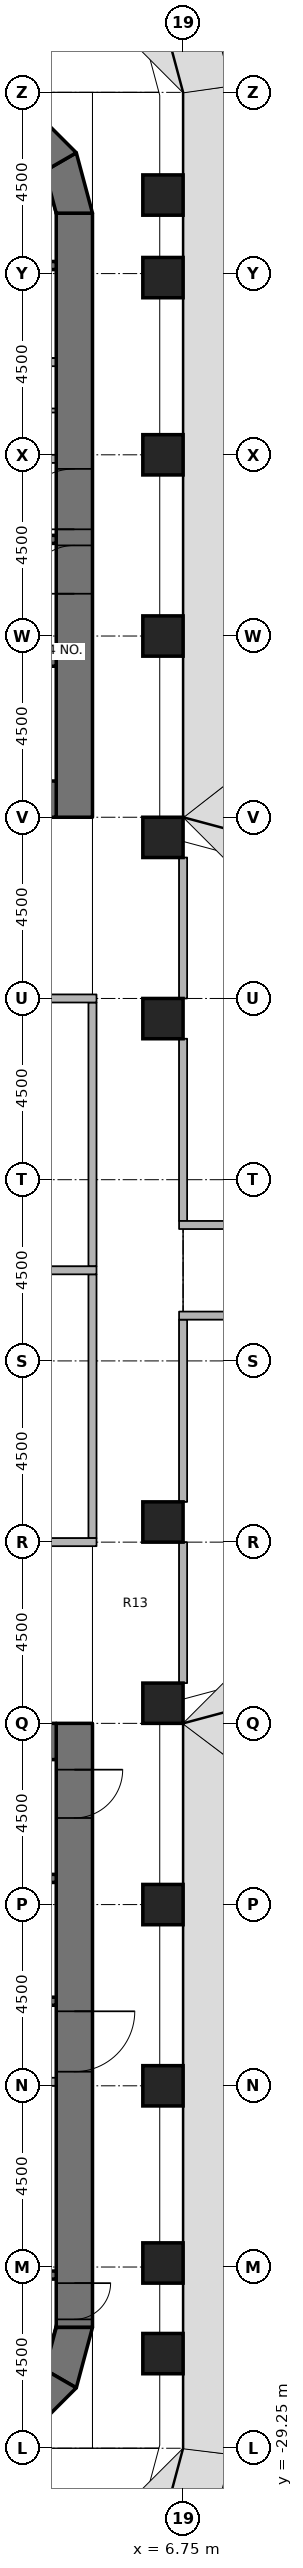
"""IFC4 building model, lengths in metres.
Left out: names, types, materials, properties, quantities, classifications, styles, units other than length and angle.
Written with IfcOpenShell. Run it as: python <this file> out.ifc"""

import sys

from ifc_helpers import new_model, si_unit, direction, frame, frame_2d, origin, origin_2d, place, context, subcontext, project, spatial, polyline, rectangle, outline, extrude, element, fill, save


model = new_model("IFC4")
c1 = context("Model", 3, precision=1e-05, world=origin(), true_north=direction((0.0, 1.0)))
c2 = subcontext(c1, "Body", "Model", "MODEL_VIEW")
j1 = project(units=[si_unit("LENGTHUNIT", "METRE"), si_unit("PLANEANGLEUNIT", "RADIAN")], contexts=[c1])
p1 = place(None, origin())
s1 = spatial("IfcSite", under=j1, at=p1, CompositionType="ELEMENT")
p2 = place(p1, origin())
s2 = spatial("IfcBuilding", under=s1, at=p2, CompositionType="ELEMENT")
p3 = place(p2, frame((0.0, 0.0, 43.8)))
s3 = spatial("IfcBuildingStorey", under=s2, at=p3, CompositionType="ELEMENT", Elevation=43.8)
for number, where, z_axis, x_axis in (
    (1, (6.25, -26.9, 0.0), (0.0, 0.0, 1.0), (1.0, 0.0, 0.0)),
    (2, (6.25, -24.65, 0.0), (0.0, 0.0, 1.0), (1.0, 0.0, 0.0)),
    (3, (6.25, -20.25, 0.0), (0.0, 0.0, 1.0), (1.0, 0.0, 0.0)),
    (4, (6.25, -15.75, 0.0), (0.0, 0.0, 1.0), (1.0, 0.0, 0.0)),
    (5, (6.25, -10.75, 0.0), (0.0, 0.0, 1.0), (1.0, 0.0, 0.0)),
    (6, (6.25, -6.25, 0.0), (0.0, 0.0, 1.0), (1.0, 0.0, 0.0)),
    (7, (6.25, 6.25, 0.0), (0.0, 0.0, 1.0), (1.0, 0.0, 0.0)),
    (8, (6.25, 10.75, 0.0), (0.0, 0.0, 1.0), (1.0, 0.0, 0.0)),
    (9, (6.25, 15.75, 0.0), (0.0, 0.0, 1.0), (1.0, 0.0, 0.0)),
    (10, (6.25, 20.25, 0.0), (0.0, 0.0, 1.0), (1.0, 0.0, 0.0)),
    (11, (6.25, 24.65, 0.0), (0.0, 0.0, 1.0), (1.0, 0.0, 0.0)),
    (12, (6.25, 26.7, 0.0), (0.0, 0.0, 1.0), (1.0, 0.0, 0.0)),
):
    element("IfcColumn", number, at=place(p3, frame(where, z_axis=z_axis, x_axis=x_axis)), inside=s3, PredefinedType="COLUMN", context=c2, shape_type="SweptSolid", body=[
        extrude(rectangle(XDim=1.0, YDim=1.0, at=origin_2d()), origin(), (0.0, 0.0, 1.0), 4.05),
    ])
p4 = place(p3, frame((4.05, 11.25, 0.0), z_axis=(0.0, 0.0, 1.0), x_axis=(0.0, 1.0, 0.0)))
e13 = element("IfcWall", 13, at=p4, inside=s3, PredefinedType="SHEAR", context=c2, shape_type="SweptSolid", body=[
    extrude(rectangle(XDim=15.0, YDim=0.9, at=frame_2d((7.5, 0.0))), origin(), (0.0, 0.0, 1.0), 4.2),
])
p5 = place(p4, frame((7.15, 0.0, 0.0)))
e14 = element("IfcOpeningElement", 14, at=p5, cuts=e13, PredefinedType="OPENING", context=c2, shape_type="SweptSolid", body=[
    extrude(rectangle(XDim=1.5, YDim=2.3, at=frame_2d((0.75, 1.15))), frame((0.0, 0.46, 0.0), z_axis=(0.0, -1.0, 0.0), x_axis=(1.0, 0.0, 0.0)), (0.0, 0.0, 1.0), 0.92),
])
p6 = place(p4, frame((5.55, 0.0, 0.0)))
e15 = element("IfcOpeningElement", 15, at=p6, cuts=e13, PredefinedType="OPENING", context=c2, shape_type="SweptSolid", body=[
    extrude(rectangle(XDim=1.2, YDim=2.1, at=frame_2d((0.6, 1.05))), frame((0.0, 0.46, 0.0), z_axis=(0.0, -1.0, 0.0), x_axis=(1.0, 0.0, 0.0)), (0.0, 0.0, 1.0), 0.92),
])
p7 = place(p3, frame((-3.6, 11.7, 0.0), z_axis=(0.0, 0.0, 1.0), x_axis=(1.0, 0.0, 0.0)))
e16 = element("IfcWall", 16, at=p7, inside=s3, PredefinedType="SHEAR", context=c2, shape_type="SweptSolid", body=[
    extrude(rectangle(XDim=7.2, YDim=0.9, at=frame_2d((3.6, 0.0))), origin(), (0.0, 0.0, 1.0), 4.2),
])
p8 = place(p3, origin())
e17 = element("IfcWall", 17, at=p8, inside=s3, PredefinedType="SHEAR", context=c2, shape_type="SweptSolid", body=[
    extrude(outline(polyline([(4.5, 26.25), (4.098, 27.75), (3.319, 27.3), (3.6, 26.25), (4.5, 26.25)])), origin(), (0.0, 0.0, 1.0), 4.2),
])
p9 = place(p3, origin())
e18 = element("IfcWall", 18, at=p9, inside=s3, PredefinedType="SHEAR", context=c2, shape_type="SweptSolid", body=[
    extrude(outline(polyline([(4.098, 27.75), (3.0, 28.848), (2.55, 28.069), (3.319, 27.3), (4.098, 27.75)])), origin(), (0.0, 0.0, 1.0), 4.2),
])
p10 = place(p3, frame((4.05, -11.25, 0.0), z_axis=(0.0, 0.0, 1.0), x_axis=(0.0, -1.0, 0.0)))
e19 = element("IfcWall", 19, at=p10, inside=s3, PredefinedType="SHEAR", context=c2, shape_type="SweptSolid", body=[
    extrude(rectangle(XDim=15.0, YDim=0.9, at=frame_2d((7.5, 0.0))), origin(), (0.0, 0.0, 1.0), 4.2),
])
p11 = place(p10, frame((7.15, 0.0, 0.0)))
e20 = element("IfcOpeningElement", 20, at=p11, cuts=e19, PredefinedType="OPENING", context=c2, shape_type="SweptSolid", body=[
    extrude(rectangle(XDim=1.5, YDim=2.3, at=frame_2d((0.75, 1.15))), frame((0.0, 0.46, 0.0), z_axis=(0.0, -1.0, 0.0), x_axis=(1.0, 0.0, 0.0)), (0.0, 0.0, 1.0), 0.92),
])
p12 = place(p10, frame((13.9, 0.0, 0.0)))
e21 = element("IfcOpeningElement", 21, at=p12, cuts=e19, PredefinedType="OPENING", context=c2, shape_type="SweptSolid", body=[
    extrude(rectangle(XDim=0.9, YDim=2.1, at=frame_2d((0.45, 1.05))), frame((0.0, 0.46, 0.0), z_axis=(0.0, -1.0, 0.0), x_axis=(1.0, 0.0, 0.0)), (0.0, 0.0, 1.0), 0.92),
])
p13 = place(p10, frame((1.15, 0.0, 0.0)))
e22 = element("IfcOpeningElement", 22, at=p13, cuts=e19, PredefinedType="OPENING", context=c2, shape_type="SweptSolid", body=[
    extrude(rectangle(XDim=1.2, YDim=2.1, at=frame_2d((0.6, 1.05))), frame((0.0, 0.46, 0.0), z_axis=(0.0, -1.0, 0.0), x_axis=(1.0, 0.0, 0.0)), (0.0, 0.0, 1.0), 0.92),
])
p14 = place(p3, frame((-3.6, -11.7, 0.0), z_axis=(0.0, 0.0, 1.0), x_axis=(1.0, 0.0, 0.0)))
e23 = element("IfcWall", 23, at=p14, inside=s3, PredefinedType="SHEAR", context=c2, shape_type="SweptSolid", body=[
    extrude(rectangle(XDim=7.2, YDim=0.9, at=frame_2d((3.6, 0.0))), origin(), (0.0, 0.0, 1.0), 4.2),
])
p15 = place(p3, origin())
e24 = element("IfcWall", 24, at=p15, inside=s3, PredefinedType="SHEAR", context=c2, shape_type="SweptSolid", body=[
    extrude(outline(polyline([(4.5, -26.25), (4.098, -27.75), (3.319, -27.3), (3.6, -26.25), (4.5, -26.25)])), origin(), (0.0, 0.0, 1.0), 4.2),
])
p16 = place(p3, origin())
e25 = element("IfcWall", 25, at=p16, inside=s3, PredefinedType="SHEAR", context=c2, shape_type="SweptSolid", body=[
    extrude(outline(polyline([(4.098, -27.75), (3.0, -28.848), (2.55, -28.069), (3.319, -27.3), (4.098, -27.75)])), origin(), (0.0, 0.0, 1.0), 4.2),
])
for number, where, z_axis, x_axis in (
    (26, (-3.6, 24.95, 0.0), (0.0, 0.0, 1.0), (1.0, 0.0, 0.0)),
    (27, (-3.6, 18.15, 0.0), (0.0, 0.0, 1.0), (1.0, 0.0, 0.0)),
    (28, (-3.6, 15.1, 0.0), (0.0, 0.0, 1.0), (1.0, 0.0, 0.0)),
):
    element("IfcWall", number, at=place(p3, frame(where, z_axis=z_axis, x_axis=x_axis)), inside=s3, PredefinedType="SHEAR", context=c2, shape_type="SweptSolid", body=[
        extrude(rectangle(XDim=7.2, YDim=0.2, at=frame_2d((3.6, 0.0))), origin(), (0.0, 0.0, 1.0), 4.05),
    ])
p17 = place(p3, frame((0.9, 20.15, 0.0), z_axis=(0.0, 0.0, 1.0), x_axis=(1.0, 0.0, 0.0)))
e29 = element("IfcWall", 29, at=p17, inside=s3, PredefinedType="PARTITIONING", context=c2, shape_type="SweptSolid", body=[
    extrude(rectangle(XDim=2.7, YDim=0.2, at=frame_2d((1.35, 0.0))), origin(), (0.0, 0.0, 1.0), 4.05),
])
p18 = place(p3, frame((1.1, 22.55, 0.0), z_axis=(0.0, 0.0, 1.0), x_axis=(1.0, 0.0, 0.0)))
e30 = element("IfcWall", 30, at=p18, inside=s3, PredefinedType="PARTITIONING", context=c2, shape_type="SweptSolid", body=[
    extrude(rectangle(XDim=2.5, YDim=0.2, at=frame_2d((1.25, 0.0))), origin(), (0.0, 0.0, 1.0), 4.05),
])
p19 = place(p3, frame((1.1, 21.35, 0.0), z_axis=(0.0, 0.0, 1.0), x_axis=(1.0, 0.0, 0.0)))
e31 = element("IfcWall", 31, at=p19, inside=s3, PredefinedType="PARTITIONING", context=c2, shape_type="SweptSolid", body=[
    extrude(rectangle(XDim=2.5, YDim=0.1, at=frame_2d((1.25, 0.0))), origin(), (0.0, 0.0, 1.0), 4.05),
])
for number, where, z_axis, x_axis in (
    (32, (3.6, -24.95, 0.0), (0.0, 0.0, 1.0), (-1.0, 0.0, 0.0)),
    (33, (3.6, -18.15, 0.0), (0.0, 0.0, 1.0), (-1.0, 0.0, 0.0)),
    (34, (3.6, -15.1, 0.0), (0.0, 0.0, 1.0), (-1.0, 0.0, 0.0)),
):
    element("IfcWall", number, at=place(p3, frame(where, z_axis=z_axis, x_axis=x_axis)), inside=s3, PredefinedType="SHEAR", context=c2, shape_type="SweptSolid", body=[
        extrude(rectangle(XDim=7.2, YDim=0.2, at=frame_2d((3.6, 0.0))), origin(), (0.0, 0.0, 1.0), 4.05),
    ])
p20 = place(p3, frame((3.6, -20.15, 0.0), z_axis=(0.0, 0.0, 1.0), x_axis=(-1.0, 0.0, 0.0)))
e35 = element("IfcWall", 35, at=p20, inside=s3, PredefinedType="PARTITIONING", context=c2, shape_type="SweptSolid", body=[
    extrude(rectangle(XDim=2.7, YDim=0.2, at=frame_2d((1.35, 0.0))), origin(), (0.0, 0.0, 1.0), 4.05),
])
for number, where, z_axis, x_axis in (
    (36, (4.5, 0.1, 0.0), (0.0, 0.0, 1.0), (0.0, 1.0, 0.0)),
    (37, (4.5, -6.65, 0.0), (0.0, 0.0, 1.0), (0.0, 1.0, 0.0)),
):
    element("IfcWall", number, at=place(p3, frame(where, z_axis=z_axis, x_axis=x_axis)), inside=s3, PredefinedType="PARTITIONING", context=c2, shape_type="SweptSolid", body=[
        extrude(rectangle(XDim=6.55, YDim=0.2, at=frame_2d((3.275, 0.0))), origin(), (0.0, 0.0, 1.0), 3.13),
    ])
p21 = place(p3, frame((6.75, 1.225, 0.0), z_axis=(0.0, 0.0, 1.0), x_axis=(0.0, 1.0, 0.0)))
e38 = element("IfcWall", 38, at=p21, inside=s3, PredefinedType="PARTITIONING", context=c2, shape_type="SweptSolid", body=[
    extrude(rectangle(XDim=4.525, YDim=0.2, at=frame_2d((2.262, 0.0))), origin(), (0.0, 0.0, 1.0), 3.13),
])
for number, where, z_axis, x_axis in (
    (39, (6.75, 6.75, 0.0), (0.0, 0.0, 1.0), (0.0, 1.0, 0.0)),
    (40, (6.75, -10.25, 0.0), (0.0, 0.0, 1.0), (0.0, 1.0, 0.0)),
):
    element("IfcWall", number, at=place(p3, frame(where, z_axis=z_axis, x_axis=x_axis)), inside=s3, PredefinedType="PARTITIONING", context=c2, shape_type="SweptSolid", body=[
        extrude(rectangle(XDim=3.5, YDim=0.2, at=frame_2d((1.75, 0.0))), origin(), (0.0, 0.0, 1.0), 3.13),
    ])
p22 = place(p3, frame((6.75, -5.75, 0.0), z_axis=(0.0, 0.0, 1.0), x_axis=(0.0, 1.0, 0.0)))
e41 = element("IfcWall", 41, at=p22, inside=s3, PredefinedType="PARTITIONING", context=c2, shape_type="SweptSolid", body=[
    extrude(rectangle(XDim=4.525, YDim=0.2, at=frame_2d((2.262, 0.0))), origin(), (0.0, 0.0, 1.0), 3.13),
])
p23 = place(p3, frame((4.6, 6.75, 0.0), z_axis=(0.0, 0.0, 1.0), x_axis=(-1.0, 0.0, 0.0)))
e42 = element("IfcWall", 42, at=p23, inside=s3, PredefinedType="PARTITIONING", context=c2, shape_type="SweptSolid", body=[
    extrude(rectangle(XDim=9.2, YDim=0.2, at=frame_2d((4.6, 0.0))), origin(), (0.0, 0.0, 1.0), 3.13),
])
p24 = place(p23, frame((4.1, 0.0, 0.0)))
e43 = element("IfcOpeningElement", 43, at=p24, cuts=e42, PredefinedType="OPENING", context=c2, shape_type="SweptSolid", body=[
    extrude(rectangle(XDim=1.0, YDim=2.1, at=frame_2d((0.5, 1.05))), frame((0.0, 0.11, 0.0), z_axis=(0.0, -1.0, 0.0), x_axis=(1.0, 0.0, 0.0)), (0.0, 0.0, 1.0), 0.22),
])
p25 = place(p3, frame((-4.6, -6.75, 0.0), z_axis=(0.0, 0.0, 1.0), x_axis=(1.0, 0.0, 0.0)))
e44 = element("IfcWall", 44, at=p25, inside=s3, PredefinedType="PARTITIONING", context=c2, shape_type="SweptSolid", body=[
    extrude(rectangle(XDim=9.2, YDim=0.2, at=frame_2d((4.6, 0.0))), origin(), (0.0, 0.0, 1.0), 3.13),
])
p26 = place(p25, frame((4.1, 0.0, 0.0)))
e45 = element("IfcOpeningElement", 45, at=p26, cuts=e44, PredefinedType="OPENING", context=c2, shape_type="SweptSolid", body=[
    extrude(rectangle(XDim=1.0, YDim=2.1, at=frame_2d((0.5, 1.05))), frame((0.0, 0.11, 0.0), z_axis=(0.0, -1.0, 0.0), x_axis=(1.0, 0.0, 0.0)), (0.0, 0.0, 1.0), 0.22),
])
p27 = place(p3, frame((-4.6, 0.0, 0.0), z_axis=(0.0, 0.0, 1.0), x_axis=(1.0, 0.0, 0.0)))
e46 = element("IfcWall", 46, at=p27, inside=s3, PredefinedType="PARTITIONING", context=c2, shape_type="SweptSolid", body=[
    extrude(rectangle(XDim=9.2, YDim=0.2, at=frame_2d((4.6, 0.0))), origin(), (0.0, 0.0, 1.0), 3.13),
])
p28 = place(p3, frame((6.65, 1.125, 0.0), z_axis=(0.0, 0.0, 1.0), x_axis=(1.0, 0.0, 0.0)))
e47 = element("IfcWall", 47, at=p28, inside=s3, PredefinedType="PARTITIONING", context=c2, shape_type="SweptSolid", body=[
    extrude(rectangle(XDim=4.7, YDim=0.2, at=frame_2d((2.35, 0.0))), origin(), (0.0, 0.0, 1.0), 3.13),
])
p29 = place(p28, frame((1.85, 0.0, 0.0)))
e48 = element("IfcOpeningElement", 48, at=p29, cuts=e47, PredefinedType="OPENING", context=c2, shape_type="SweptSolid", body=[
    extrude(rectangle(XDim=1.0, YDim=2.1, at=frame_2d((0.5, 1.05))), frame((0.0, 0.11, 0.0), z_axis=(0.0, -1.0, 0.0), x_axis=(1.0, 0.0, 0.0)), (0.0, 0.0, 1.0), 0.22),
])
p30 = place(p3, frame((11.35, -1.125, 0.0), z_axis=(0.0, 0.0, 1.0), x_axis=(-1.0, 0.0, 0.0)))
e49 = element("IfcWall", 49, at=p30, inside=s3, PredefinedType="PARTITIONING", context=c2, shape_type="SweptSolid", body=[
    extrude(rectangle(XDim=4.7, YDim=0.2, at=frame_2d((2.35, 0.0))), origin(), (0.0, 0.0, 1.0), 3.13),
])
p31 = place(p30, frame((1.85, 0.0, 0.0)))
e50 = element("IfcOpeningElement", 50, at=p31, cuts=e49, PredefinedType="OPENING", context=c2, shape_type="SweptSolid", body=[
    extrude(rectangle(XDim=1.0, YDim=2.1, at=frame_2d((0.5, 1.05))), frame((0.0, 0.11, 0.0), z_axis=(0.0, -1.0, 0.0), x_axis=(1.0, 0.0, 0.0)), (0.0, 0.0, 1.0), 0.22),
])
p32 = place(p5, origin())
e51 = element("IfcDoor", 51, at=p32, inside=s3, OperationType="DOUBLE_DOOR_SINGLE_SWING", PredefinedType="DOOR", context=c2, shape_type="SweptSolid", body=[
    extrude(rectangle(XDim=1.5, YDim=2.3, at=frame_2d((0.75, 1.15))), frame((0.0, 0.025, 0.0), z_axis=(0.0, -1.0, 0.0), x_axis=(1.0, 0.0, 0.0)), (0.0, 0.0, 1.0), 0.05),
])
fill(e14, e51)
p33 = place(p6, origin())
e52 = element("IfcDoor", 52, at=p33, inside=s3, OperationType="SINGLE_SWING_RIGHT", PredefinedType="DOOR", context=c2, shape_type="SweptSolid", body=[
    extrude(rectangle(XDim=1.2, YDim=2.1, at=frame_2d((0.6, 1.05))), frame((0.0, 0.025, 0.0), z_axis=(0.0, -1.0, 0.0), x_axis=(1.0, 0.0, 0.0)), (0.0, 0.0, 1.0), 0.05),
])
fill(e15, e52)
p34 = place(p11, origin())
e53 = element("IfcDoor", 53, at=p34, inside=s3, OperationType="DOUBLE_DOOR_SINGLE_SWING", PredefinedType="DOOR", context=c2, shape_type="SweptSolid", body=[
    extrude(rectangle(XDim=1.5, YDim=2.3, at=frame_2d((0.75, 1.15))), frame((0.0, 0.025, 0.0), z_axis=(0.0, -1.0, 0.0), x_axis=(1.0, 0.0, 0.0)), (0.0, 0.0, 1.0), 0.05),
])
fill(e20, e53)
p35 = place(p12, origin())
e54 = element("IfcDoor", 54, at=p35, inside=s3, OperationType="SINGLE_SWING_RIGHT", PredefinedType="DOOR", context=c2, shape_type="SweptSolid", body=[
    extrude(rectangle(XDim=0.9, YDim=2.1, at=frame_2d((0.45, 1.05))), frame((0.0, 0.025, 0.0), z_axis=(0.0, -1.0, 0.0), x_axis=(1.0, 0.0, 0.0)), (0.0, 0.0, 1.0), 0.05),
])
fill(e21, e54)
p36 = place(p13, origin())
e55 = element("IfcDoor", 55, at=p36, inside=s3, OperationType="SINGLE_SWING_LEFT", PredefinedType="DOOR", context=c2, shape_type="SweptSolid", body=[
    extrude(rectangle(XDim=1.2, YDim=2.1, at=frame_2d((0.6, 1.05))), frame((0.0, 0.025, 0.0), z_axis=(0.0, -1.0, 0.0), x_axis=(1.0, 0.0, 0.0)), (0.0, 0.0, 1.0), 0.05),
])
fill(e22, e55)
save(model, sys.argv[1])
